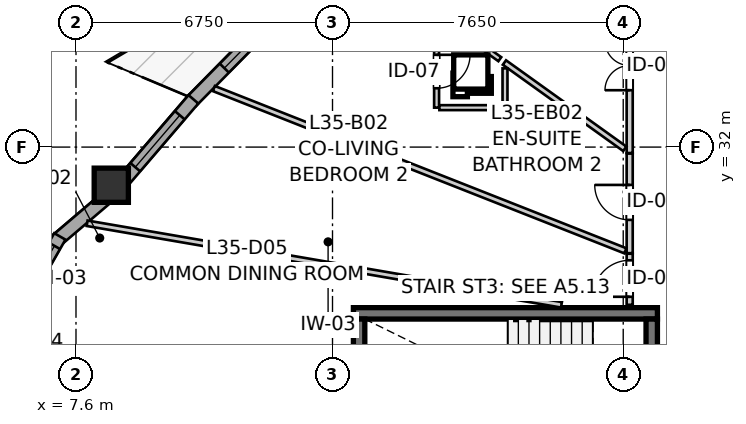
"""IFC4 building model, lengths in metres.
Left out: names, types, materials, properties, quantities, classifications, styles, units other than length and angle.
Written with IfcOpenShell. Run it as: python <this file> out.ifc"""

import sys

from ifc_helpers import new_model, si_unit, direction, frame, frame_2d, origin, origin_2d, place, context, subcontext, project, spatial, rectangle, extrude, source, transform, mapped, element, fill, save


model = new_model("IFC4")
c1 = context("Model", 3, precision=1e-05, world=origin(), true_north=direction((0.0, 1.0)))
c2 = subcontext(c1, "Body", "Model", "MODEL_VIEW")
j1 = project(units=[si_unit("LENGTHUNIT", "METRE"), si_unit("PLANEANGLEUNIT", "RADIAN")], contexts=[c1])
p1 = place(None, origin())
s1 = spatial("IfcSite", under=j1, at=p1, CompositionType="ELEMENT")
p2 = place(p1, origin())
s2 = spatial("IfcBuilding", under=s1, at=p2, CompositionType="ELEMENT")
p3 = place(p2, frame((0.0, 0.0, 118.4)))
s3 = spatial("IfcBuildingStorey", under=s2, at=p3, CompositionType="ELEMENT", Elevation=118.4)
p4 = place(p3, frame((22.9, 27.625, 0.0), z_axis=(0.0, 0.0, 1.0), x_axis=(-1.0, 0.0, 0.0)))
e1 = element("IfcWall", 1, at=p4, inside=s3, PredefinedType="SHEAR", context=c2, shape_type="SweptSolid", body=[
    extrude(rectangle(XDim=8.0, YDim=0.3, at=frame_2d((4.0, 0.0))), origin(), (0.0, 0.0, 1.0), 2.95),
])
p5 = place(p3, frame((15.05, 27.475, 0.0), z_axis=(0.0, 0.0, 1.0), x_axis=(0.0, -1.0, 0.0)))
e2 = element("IfcWall", 2, at=p5, inside=s3, PredefinedType="SHEAR", context=c2, shape_type="SweptSolid", body=[
    extrude(rectangle(XDim=2.95, YDim=0.3, at=frame_2d((1.475, 0.0))), origin(), (0.0, 0.0, 1.0), 2.95),
])
p6 = place(p3, frame((22.75, 24.525, 0.0), z_axis=(0.0, 0.0, 1.0), x_axis=(0.0, 1.0, 0.0)))
e3 = element("IfcWall", 3, at=p6, inside=s3, PredefinedType="SHEAR", context=c2, shape_type="SweptSolid", body=[
    extrude(rectangle(XDim=2.95, YDim=0.3, at=frame_2d((1.475, 0.0))), origin(), (0.0, 0.0, 1.0), 2.95),
])
p7 = place(p6, frame((0.985, 0.0, 0.0)))
e4 = element("IfcOpeningElement", 4, at=p7, cuts=e3, PredefinedType="OPENING", context=c2, shape_type="SweptSolid", body=[
    extrude(rectangle(XDim=0.98, YDim=2.15, at=frame_2d((0.49, 1.075))), frame((0.0, 0.16, 0.0), z_axis=(0.0, -1.0, 0.0), x_axis=(1.0, 0.0, 0.0)), (0.0, 0.0, 1.0), 0.32),
])
m1 = source(origin(), c2, "Body", "SweptSolid", [
    extrude(rectangle(XDim=0.9, YDim=0.9, at=origin_2d()), origin(), (0.0, 0.0, 1.0), 2.95),
])
p8 = place(p3, frame((8.529, 30.996, 0.0), z_axis=(0.0, 0.0, 1.0), x_axis=(1.0, 0.0, 0.0)))
e5 = element("IfcColumn", 5, at=p8, inside=s3, PredefinedType="COLUMN", context=c2, shape_type="MappedRepresentation", body=[
    mapped(m1, transform((0.0, 0.0, 0.0), x_axis=(1.0, 0.0, 0.0), y_axis=(0.0, 1.0, 0.0), z_axis=(0.0, 0.0, 1.0), scale=1.0)),
])
p9 = place(p3, frame((8.464, 30.718, 0.0), z_axis=(0.0, 0.0, 1.0), x_axis=(-0.76120118347, -0.648515811899, 0.0)))
e6 = element("IfcWall", 6, at=p9, inside=s3, PredefinedType="SOLIDWALL", context=c2, shape_type="SweptSolid", body=[
    extrude(rectangle(XDim=1.805, YDim=0.34, at=frame_2d((0.902, 0.0))), origin(), (0.0, 0.0, 1.0), 2.48),
])
p10 = place(p3, frame((7.175, 29.65, 0.0), z_axis=(0.0, 0.0, 1.0), x_axis=(-0.495999400124, -0.868322863385, 0.0)))
e7 = element("IfcWall", 7, at=p10, inside=s3, PredefinedType="SOLIDWALL", context=c2, shape_type="SweptSolid", body=[
    extrude(rectangle(XDim=2.073, YDim=0.34, at=frame_2d((1.036, 0.0))), origin(), (0.0, 0.0, 1.0), 2.48),
])
p11 = place(p10, frame((0.286, 0.0, 0.82)))
e8 = element("IfcOpeningElement", 8, at=p11, cuts=e7, PredefinedType="OPENING", context=c2, shape_type="SweptSolid", body=[
    extrude(rectangle(XDim=1.5, YDim=1.45, at=frame_2d((0.75, 0.725))), frame((0.0, 0.18, 0.0), z_axis=(0.0, -1.0, 0.0), x_axis=(1.0, 0.0, 0.0)), (0.0, 0.0, 1.0), 0.36),
])
p12 = place(p3, frame((12.764, 35.357, 0.0), z_axis=(0.0, 0.0, 1.0), x_axis=(-0.701906045867, -0.712269543625, 0.0)))
e9 = element("IfcWall", 9, at=p12, inside=s3, PredefinedType="SOLIDWALL", context=c2, shape_type="SweptSolid", body=[
    extrude(rectangle(XDim=3.039, YDim=0.34, at=frame_2d((1.52, 0.0))), origin(), (0.0, 0.0, 1.0), 2.48),
])
p13 = place(p12, frame((0.646, 0.0, 0.82)))
e10 = element("IfcOpeningElement", 10, at=p13, cuts=e9, PredefinedType="OPENING", context=c2, shape_type="SweptSolid", body=[
    extrude(rectangle(XDim=1.15, YDim=1.2, at=frame_2d((0.575, 0.6))), frame((0.0, 0.18, 0.0), z_axis=(0.0, -1.0, 0.0), x_axis=(1.0, 0.0, 0.0)), (0.0, 0.0, 1.0), 0.36),
])
p14 = place(p3, frame((10.69, 33.257, 0.0), z_axis=(0.0, 0.0, 1.0), x_axis=(-0.650763576187, -0.759280427714, 0.0)))
e11 = element("IfcWall", 11, at=p14, inside=s3, PredefinedType="SOLIDWALL", context=c2, shape_type="SweptSolid", body=[
    extrude(rectangle(XDim=2.893, YDim=0.34, at=frame_2d((1.447, 0.0))), origin(), (0.0, 0.0, 1.0), 2.48),
])
p15 = place(p14, frame((0.552, 0.0, 0.82)))
e12 = element("IfcOpeningElement", 12, at=p15, cuts=e11, PredefinedType="OPENING", context=c2, shape_type="SweptSolid", body=[
    extrude(rectangle(XDim=1.8, YDim=1.45, at=frame_2d((0.9, 0.725))), frame((0.0, 0.18, 0.0), z_axis=(0.0, -1.0, 0.0), x_axis=(1.0, 0.0, 0.0)), (0.0, 0.0, 1.0), 0.36),
])
p16 = place(p3, frame((22.17, 31.844, 0.0), z_axis=(0.0, 0.0, 1.0), x_axis=(0.0, 1.0, 0.0)))
e13 = element("IfcWall", 13, at=p16, inside=s3, PredefinedType="PARTITIONING", context=c2, shape_type="SweptSolid", body=[
    extrude(rectangle(XDim=4.586, YDim=0.16, at=frame_2d((2.293, 0.0))), origin(), (0.0, 0.0, 1.0), 2.95),
])
p17 = place(p16, frame((1.653, 0.0, 0.0)))
e14 = element("IfcOpeningElement", 14, at=p17, cuts=e13, PredefinedType="OPENING", context=c2, shape_type="SweptSolid", body=[
    extrude(rectangle(XDim=1.3, YDim=2.1, at=frame_2d((0.65, 1.05))), frame((0.0, 0.09, 0.0), z_axis=(0.0, -1.0, 0.0), x_axis=(1.0, 0.0, 0.0)), (0.0, 0.0, 1.0), 0.18),
])
p18 = place(p3, frame((22.17, 29.209, 0.0), z_axis=(0.0, 0.0, 1.0), x_axis=(0.0, 1.0, 0.0)))
e15 = element("IfcWall", 15, at=p18, inside=s3, PredefinedType="PARTITIONING", context=c2, shape_type="SweptSolid", body=[
    extrude(rectangle(XDim=2.62, YDim=0.16, at=frame_2d((1.31, 0.0))), origin(), (0.0, 0.0, 1.0), 2.95),
])
p19 = place(p18, frame((0.875, 0.0, 0.0)))
e16 = element("IfcOpeningElement", 16, at=p19, cuts=e15, PredefinedType="OPENING", context=c2, shape_type="SweptSolid", body=[
    extrude(rectangle(XDim=0.92, YDim=2.1, at=frame_2d((0.46, 1.05))), frame((0.0, 0.09, 0.0), z_axis=(0.0, -1.0, 0.0), x_axis=(1.0, 0.0, 0.0)), (0.0, 0.0, 1.0), 0.18),
])
p20 = place(p3, frame((17.089, 34.938, 0.0), z_axis=(0.0, 0.0, 1.0), x_axis=(0.0, -1.0, 0.0)))
e17 = element("IfcWall", 17, at=p20, inside=s3, PredefinedType="PARTITIONING", context=c2, shape_type="SweptSolid", body=[
    extrude(rectangle(XDim=1.9, YDim=0.13, at=frame_2d((0.95, 0.0))), origin(), (0.0, 0.0, 1.0), 2.95),
])
p21 = place(p20, frame((0.51, 0.0, 0.0)))
e18 = element("IfcOpeningElement", 18, at=p21, cuts=e17, PredefinedType="OPENING", context=c2, shape_type="SweptSolid", body=[
    extrude(rectangle(XDim=0.88, YDim=2.05, at=frame_2d((0.44, 1.025))), frame((0.0, 0.075, 0.0), z_axis=(0.0, -1.0, 0.0), x_axis=(1.0, 0.0, 0.0)), (0.0, 0.0, 1.0), 0.15),
])
p22 = place(p3, frame((22.17, 27.85, 0.0), z_axis=(0.0, 0.0, 1.0), x_axis=(0.0, 1.0, 0.0)))
e19 = element("IfcWall", 19, at=p22, inside=s3, PredefinedType="PARTITIONING", context=c2, shape_type="SweptSolid", body=[
    extrude(rectangle(XDim=1.344, YDim=0.16, at=frame_2d((0.672, 0.0))), origin(), (0.0, 0.0, 1.0), 2.95),
])
p23 = place(p22, frame((0.211, 0.0, 0.0)))
e20 = element("IfcOpeningElement", 20, at=p23, cuts=e19, PredefinedType="OPENING", context=c2, shape_type="SweptSolid", body=[
    extrude(rectangle(XDim=0.96, YDim=2.1, at=frame_2d((0.48, 1.05))), frame((0.0, 0.09, 0.0), z_axis=(0.0, -1.0, 0.0), x_axis=(1.0, 0.0, 0.0)), (0.0, 0.0, 1.0), 0.18),
])
p24 = place(p3, frame((7.893, 29.996, 0.0), z_axis=(0.0, 0.0, 1.0), x_axis=(0.985544917876, -0.169414328938, 0.0)))
e21 = element("IfcWall", 21, at=p24, inside=s3, PredefinedType="PARTITIONING", context=c2, shape_type="SweptSolid", body=[
    extrude(rectangle(XDim=12.664, YDim=0.145, at=frame_2d((6.332, 0.0))), origin(), (0.0, 0.0, 1.0), 2.95),
])
p25 = place(p3, frame((11.228, 33.54, 0.0), z_axis=(0.0, 0.0, 1.0), x_axis=(0.930301058265, -0.366796866114, 0.0)))
e22 = element("IfcWall", 22, at=p25, inside=s3, PredefinedType="PARTITIONING", context=c2, shape_type="SweptSolid", body=[
    extrude(rectangle(XDim=11.639, YDim=0.145, at=frame_2d((5.82, 0.0))), origin(), (0.0, 0.0, 1.0), 2.95),
])
p26 = place(p3, frame((18.874, 34.225, 0.0), z_axis=(0.0, 0.0, 1.0), x_axis=(0.812826521731, -0.582505833079, 0.0)))
e23 = element("IfcWall", 23, at=p26, inside=s3, PredefinedType="PARTITIONING", context=c2, shape_type="SweptSolid", body=[
    extrude(rectangle(XDim=3.896, YDim=0.145, at=frame_2d((1.948, 0.0))), origin(), (0.0, 0.0, 1.0), 2.95),
])
p27 = place(p3, frame((17.162, 33.038, 0.0), z_axis=(0.0, 0.0, 1.0), x_axis=(1.0, 0.0, 0.0)))
e24 = element("IfcWall", 24, at=p27, inside=s3, PredefinedType="PARTITIONING", context=c2, shape_type="SweptSolid", body=[
    extrude(rectangle(XDim=1.727, YDim=0.13, at=frame_2d((0.863, 0.0))), origin(), (0.0, 0.0, 1.0), 2.95),
])
p28 = place(p3, frame((18.889, 33.111, 0.0), z_axis=(0.0, 0.0, 1.0), x_axis=(0.0, 1.0, 0.0)))
e25 = element("IfcWall", 25, at=p28, inside=s3, PredefinedType="PARTITIONING", context=c2, shape_type="SweptSolid", body=[
    extrude(rectangle(XDim=0.96, YDim=0.13, at=frame_2d((0.48, 0.0))), origin(), (0.0, 0.0, 1.0), 2.95),
])
p29 = place(p3, frame((17.913, 34.914, 0.0), z_axis=(0.0, 0.0, 1.0), x_axis=(0.812774229327, -0.582578794792, 0.0)))
e26 = element("IfcWall", 26, at=p29, inside=s3, PredefinedType="PARTITIONING", context=c2, shape_type="SweptSolid", body=[
    extrude(rectangle(XDim=1.033, YDim=0.13, at=frame_2d((0.517, 0.0))), origin(), (0.0, 0.0, 1.0), 2.95),
])
m2 = source(origin(), c2, "Body", "SweptSolid", [
    extrude(rectangle(XDim=1.5, YDim=1.45, at=frame_2d((0.75, 0.725))), frame((0.0, 0.03, 0.0), z_axis=(0.0, -1.0, 0.0), x_axis=(1.0, 0.0, 0.0)), (0.0, 0.0, 1.0), 0.06),
])
p30 = place(p11, origin())
e27 = element("IfcWindow", 27, at=p30, inside=s3, PartitioningType="SINGLE_PANEL", PredefinedType="WINDOW", context=c2, shape_type="MappedRepresentation", body=[
    mapped(m2, transform((0.0, 0.0, 0.0), x_axis=(1.0, 0.0, 0.0), y_axis=(0.0, 1.0, 0.0), z_axis=(0.0, 0.0, 1.0), scale=1.0)),
])
fill(e8, e27)
m3 = source(origin(), c2, "Body", "SweptSolid", [
    extrude(rectangle(XDim=1.15, YDim=1.2, at=frame_2d((0.575, 0.6))), frame((0.0, 0.03, 0.0), z_axis=(0.0, -1.0, 0.0), x_axis=(1.0, 0.0, 0.0)), (0.0, 0.0, 1.0), 0.06),
])
p31 = place(p13, origin())
e28 = element("IfcWindow", 28, at=p31, inside=s3, PartitioningType="SINGLE_PANEL", PredefinedType="WINDOW", context=c2, shape_type="MappedRepresentation", body=[
    mapped(m3, transform((0.0, 0.0, 0.0), x_axis=(1.0, 0.0, 0.0), y_axis=(0.0, 1.0, 0.0), z_axis=(0.0, 0.0, 1.0), scale=1.0)),
])
fill(e10, e28)
m4 = source(origin(), c2, "Body", "SweptSolid", [
    extrude(rectangle(XDim=1.8, YDim=1.45, at=frame_2d((0.9, 0.725))), frame((0.0, 0.03, 0.0), z_axis=(0.0, -1.0, 0.0), x_axis=(1.0, 0.0, 0.0)), (0.0, 0.0, 1.0), 0.06),
])
p32 = place(p15, origin())
e29 = element("IfcWindow", 29, at=p32, inside=s3, PartitioningType="SINGLE_PANEL", PredefinedType="WINDOW", context=c2, shape_type="MappedRepresentation", body=[
    mapped(m4, transform((0.0, 0.0, 0.0), x_axis=(1.0, 0.0, 0.0), y_axis=(0.0, 1.0, 0.0), z_axis=(0.0, 0.0, 1.0), scale=1.0)),
])
fill(e12, e29)
m5 = source(origin(), c2, "Body", "SweptSolid", [
    extrude(rectangle(XDim=1.3, YDim=2.1, at=frame_2d((0.65, 1.05))), frame((0.0, 0.025, 0.0), z_axis=(0.0, -1.0, 0.0), x_axis=(1.0, 0.0, 0.0)), (0.0, 0.0, 1.0), 0.05),
])
p33 = place(p17, origin())
e30 = element("IfcDoor", 30, at=p33, inside=s3, OperationType="DOUBLE_DOOR_SINGLE_SWING", PredefinedType="DOOR", context=c2, shape_type="MappedRepresentation", body=[
    mapped(m5, transform((0.0, 0.0, 0.0), x_axis=(1.0, 0.0, 0.0), y_axis=(0.0, 1.0, 0.0), z_axis=(0.0, 0.0, 1.0), scale=1.0)),
])
fill(e14, e30)
m6 = source(origin(), c2, "Body", "SweptSolid", [
    extrude(rectangle(XDim=0.92, YDim=2.1, at=frame_2d((0.46, 1.05))), frame((0.0, 0.025, 0.0), z_axis=(0.0, -1.0, 0.0), x_axis=(1.0, 0.0, 0.0)), (0.0, 0.0, 1.0), 0.05),
])
p34 = place(p19, origin())
e31 = element("IfcDoor", 31, at=p34, inside=s3, OperationType="SINGLE_SWING_RIGHT", PredefinedType="DOOR", context=c2, shape_type="MappedRepresentation", body=[
    mapped(m6, transform((0.0, 0.0, 0.0), x_axis=(1.0, 0.0, 0.0), y_axis=(0.0, 1.0, 0.0), z_axis=(0.0, 0.0, 1.0), scale=1.0)),
])
fill(e16, e31)
m7 = source(origin(), c2, "Body", "SweptSolid", [
    extrude(rectangle(XDim=0.88, YDim=2.05, at=frame_2d((0.44, 1.025))), frame((0.0, 0.025, 0.0), z_axis=(0.0, -1.0, 0.0), x_axis=(1.0, 0.0, 0.0)), (0.0, 0.0, 1.0), 0.05),
])
p35 = place(p21, origin())
e32 = element("IfcDoor", 32, at=p35, inside=s3, OperationType="SINGLE_SWING_LEFT", PredefinedType="DOOR", context=c2, shape_type="MappedRepresentation", body=[
    mapped(m7, transform((0.0, 0.0, 0.0), x_axis=(1.0, 0.0, 0.0), y_axis=(0.0, 1.0, 0.0), z_axis=(0.0, 0.0, 1.0), scale=1.0)),
])
fill(e18, e32)
m8 = source(origin(), c2, "Body", "SweptSolid", [
    extrude(rectangle(XDim=0.96, YDim=2.1, at=frame_2d((0.48, 1.05))), frame((0.0, 0.025, 0.0), z_axis=(0.0, -1.0, 0.0), x_axis=(1.0, 0.0, 0.0)), (0.0, 0.0, 1.0), 0.05),
])
p36 = place(p23, origin())
e33 = element("IfcDoor", 33, at=p36, inside=s3, OperationType="SINGLE_SWING_LEFT", PredefinedType="DOOR", context=c2, shape_type="MappedRepresentation", body=[
    mapped(m8, transform((0.0, 0.0, 0.0), x_axis=(1.0, 0.0, 0.0), y_axis=(0.0, 1.0, 0.0), z_axis=(0.0, 0.0, 1.0), scale=1.0)),
])
fill(e20, e33)
save(model, sys.argv[1])
